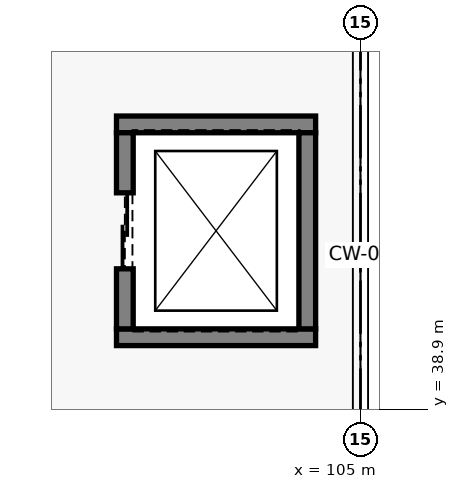
"""IFC4 building model, lengths in metres.
Left out: names, types, materials, properties, quantities, classifications, styles, units other than length and angle.
Written with IfcOpenShell. Run it as: python <this file> out.ifc"""

import sys

from ifc_helpers import new_model, si_unit, direction, frame, frame_2d, origin, place, context, subcontext, project, spatial, rectangle, extrude, element, fill, save


model = new_model("IFC4")
c1 = context("Model", 3, precision=1e-05, world=origin(), true_north=direction((0.0, 1.0)))
c2 = subcontext(c1, "Body", "Model", "MODEL_VIEW")
j1 = project(units=[si_unit("LENGTHUNIT", "METRE"), si_unit("PLANEANGLEUNIT", "RADIAN")], contexts=[c1])
p1 = place(None, origin())
s1 = spatial("IfcSite", under=j1, at=p1, CompositionType="ELEMENT")
p2 = place(p1, origin())
s2 = spatial("IfcBuilding", under=s1, at=p2, CompositionType="ELEMENT")
p3 = place(p2, frame((0.0, 0.0, 9.0)))
s3 = spatial("IfcBuildingStorey", under=s2, at=p3, CompositionType="ELEMENT", Elevation=9.0)
for number, where, z_axis, x_axis in (
    (1, (101.79, 39.85, 0.0), (0.0, 0.0, 1.0), (1.0, 0.0, 0.0)),
    (2, (101.79, 42.65, 0.0), (0.0, 0.0, 1.0), (1.0, 0.0, 0.0)),
):
    element("IfcWall", number, at=place(p3, frame(where, z_axis=z_axis, x_axis=x_axis)), inside=s3, PredefinedType="SOLIDWALL", context=c2, shape_type="SweptSolid", body=[
        extrude(rectangle(XDim=2.62, YDim=0.22, at=frame_2d((1.31, 0.0))), origin(), (0.0, 0.0, 1.0), 3.92),
    ])
p4 = place(p3, frame((101.9, 39.96, 0.0), z_axis=(0.0, 0.0, 1.0), x_axis=(0.0, 1.0, 0.0)))
e3 = element("IfcWall", 3, at=p4, inside=s3, PredefinedType="SOLIDWALL", context=c2, shape_type="SweptSolid", body=[
    extrude(rectangle(XDim=2.58, YDim=0.22, at=frame_2d((1.29, 0.0))), origin(), (0.0, 0.0, 1.0), 3.92),
])
p5 = place(p4, frame((0.79, 0.0, 0.0)))
e4 = element("IfcOpeningElement", 4, at=p5, cuts=e3, PredefinedType="OPENING", context=c2, shape_type="SweptSolid", body=[
    extrude(rectangle(XDim=1.0, YDim=2.15, at=frame_2d((0.5, 1.075))), frame((0.0, 0.12, 0.0), z_axis=(0.0, -1.0, 0.0), x_axis=(1.0, 0.0, 0.0)), (0.0, 0.0, 1.0), 0.24),
])
p6 = place(p3, frame((104.3, 39.96, 0.0), z_axis=(0.0, 0.0, 1.0), x_axis=(0.0, 1.0, 0.0)))
e5 = element("IfcWall", 5, at=p6, inside=s3, PredefinedType="SOLIDWALL", context=c2, shape_type="SweptSolid", body=[
    extrude(rectangle(XDim=2.58, YDim=0.22, at=frame_2d((1.29, 0.0))), origin(), (0.0, 0.0, 1.0), 3.92),
])
p7 = place(p5, origin())
e6 = element("IfcDoor", 6, at=p7, inside=s3, OperationType="SLIDING_TO_LEFT", PredefinedType="DOOR", context=c2, shape_type="SweptSolid", body=[
    extrude(rectangle(XDim=1.0, YDim=2.15, at=frame_2d((0.5, 1.075))), frame((0.0, 0.025, 0.0), z_axis=(0.0, -1.0, 0.0), x_axis=(1.0, 0.0, 0.0)), (0.0, 0.0, 1.0), 0.05),
])
fill(e4, e6)
save(model, sys.argv[1])
